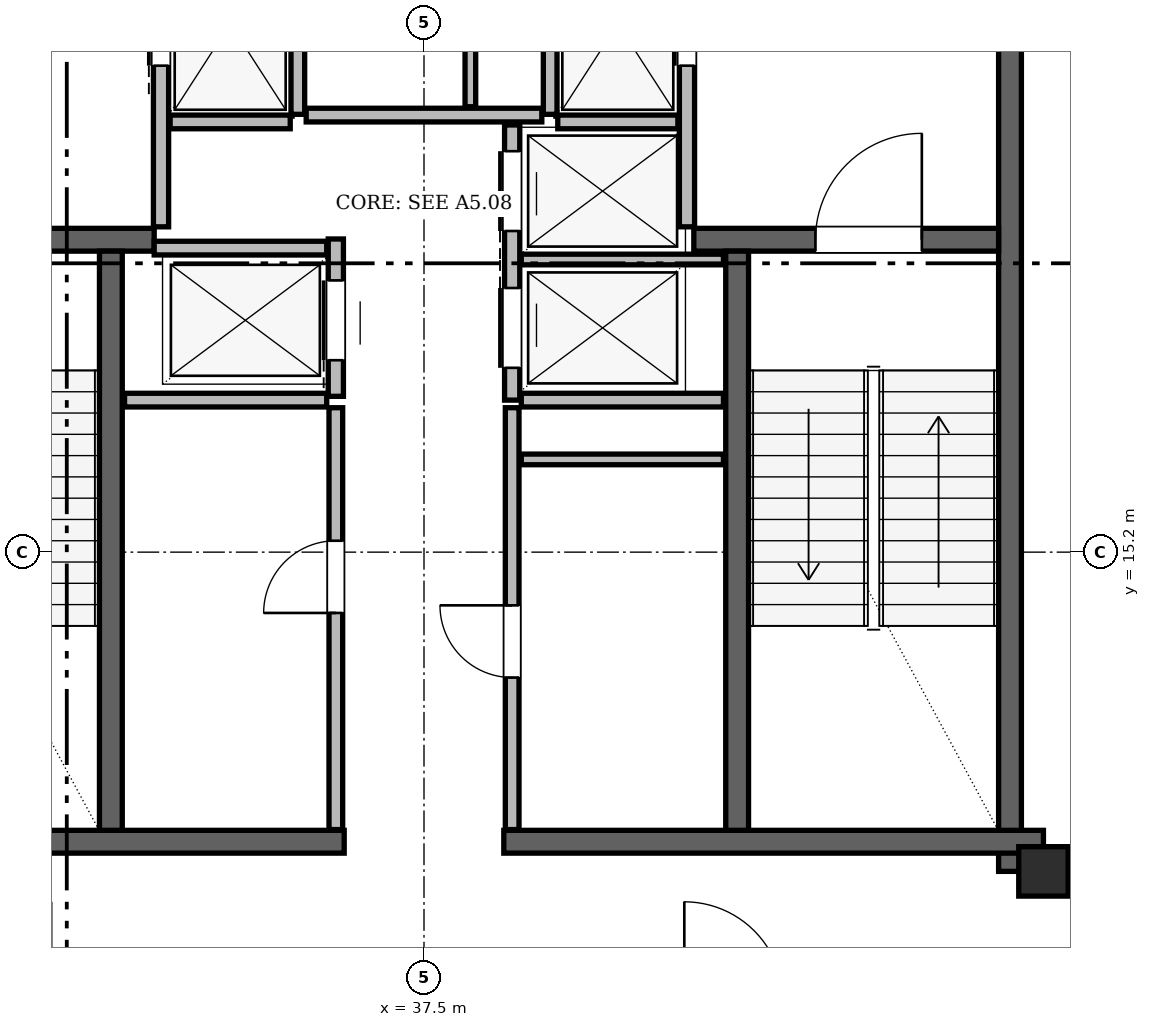
"""IFC4 building model, lengths in metres.
Left out: names, types, materials, properties, quantities, classifications, styles, units other than length and angle.
Written with IfcOpenShell. Run it as: python <this file> out.ifc"""

import sys

from ifc_helpers import new_model, si_unit, direction, frame, frame_2d, origin, origin_2d, place, context, subcontext, project, spatial, rectangle, hollow_rectangle, extrude, element, fill, save


model = new_model("IFC4")
c1 = context("Model", 3, precision=1e-05, world=origin(), true_north=direction((0.0, 1.0)))
c2 = subcontext(c1, "Body", "Model", "MODEL_VIEW")
j1 = project(units=[si_unit("LENGTHUNIT", "METRE"), si_unit("PLANEANGLEUNIT", "RADIAN")], contexts=[c1])
p1 = place(None, origin())
s1 = spatial("IfcSite", under=j1, at=p1, CompositionType="ELEMENT")
p2 = place(p1, origin())
s2 = spatial("IfcBuilding", under=s1, at=p2, CompositionType="ELEMENT")
p3 = place(p2, frame((0.0, 0.0, 305.1)))
s3 = spatial("IfcBuildingStorey", under=s2, at=p3, CompositionType="ELEMENT", Elevation=305.1)
p4 = place(p3, frame((45.65, 11.0, 0.0), z_axis=(0.0, 0.0, 1.0), x_axis=(1.0, 0.0, 0.0)))
e1 = element("IfcColumn", 1, at=p4, inside=s3, PredefinedType="COLUMN", context=c2, shape_type="SweptSolid", body=[
    extrude(hollow_rectangle(XDim=0.65, YDim=0.65, WallThickness=0.05, at=origin_2d()), origin(), (0.0, 0.0, 1.0), 4.5),
])
p5 = place(p3, frame((45.21, 11.0, 0.0), z_axis=(0.0, 0.0, 1.0), x_axis=(0.0, 1.0, 0.0)))
e2 = element("IfcWall", 2, at=p5, inside=s3, PredefinedType="SHEAR", context=c2, shape_type="SweptSolid", body=[
    extrude(rectangle(XDim=13.3, YDim=0.3, at=frame_2d((6.65, 0.0))), origin(), (0.0, 0.0, 1.0), 4.28),
])
for number, where, z_axis, x_axis in (
    (3, (29.35, 11.39, 0.0), (0.0, 0.0, 1.0), (1.0, 0.0, 0.0)),
    (4, (38.55, 11.39, 0.0), (0.0, 0.0, 1.0), (1.0, 0.0, 0.0)),
):
    element("IfcWall", number, at=place(p3, frame(where, z_axis=z_axis, x_axis=x_axis)), inside=s3, PredefinedType="SHEAR", context=c2, shape_type="SweptSolid", body=[
        extrude(rectangle(XDim=7.1, YDim=0.3, at=frame_2d((3.55, 0.0))), origin(), (0.0, 0.0, 1.0), 4.28),
    ])
p6 = place(p3, frame((29.94, 19.31, 0.0), z_axis=(0.0, 0.0, 1.0), x_axis=(1.0, 0.0, 0.0)))
e5 = element("IfcWall", 5, at=p6, inside=s3, PredefinedType="SHEAR", context=c2, shape_type="SweptSolid", body=[
    extrude(rectangle(XDim=4.01, YDim=0.3, at=frame_2d((2.005, 0.0))), origin(), (0.0, 0.0, 1.0), 4.28),
])
p7 = place(p6, frame((1.01, 0.0, 0.0)))
e6 = element("IfcOpeningElement", 6, at=p7, cuts=e5, PredefinedType="OPENING", context=c2, shape_type="SweptSolid", body=[
    extrude(rectangle(XDim=1.4, YDim=2.2, at=frame_2d((0.7, 1.1))), frame((0.0, 0.15, 0.0), z_axis=(0.0, -1.0, 0.0), x_axis=(1.0, 0.0, 0.0)), (0.0, 0.0, 1.0), 0.3),
])
p8 = place(p3, frame((41.05, 19.31, 0.0), z_axis=(0.0, 0.0, 1.0), x_axis=(1.0, 0.0, 0.0)))
e7 = element("IfcWall", 7, at=p8, inside=s3, PredefinedType="SHEAR", context=c2, shape_type="SweptSolid", body=[
    extrude(rectangle(XDim=4.01, YDim=0.3, at=frame_2d((2.005, 0.0))), origin(), (0.0, 0.0, 1.0), 4.28),
])
p9 = place(p8, frame((1.6, 0.0, 0.0)))
e8 = element("IfcOpeningElement", 8, at=p9, cuts=e7, PredefinedType="OPENING", context=c2, shape_type="SweptSolid", body=[
    extrude(rectangle(XDim=1.4, YDim=2.2, at=frame_2d((0.7, 1.1))), frame((0.0, 0.15, 0.0), z_axis=(0.0, -1.0, 0.0), x_axis=(1.0, 0.0, 0.0)), (0.0, 0.0, 1.0), 0.3),
])
for number, where, z_axis, x_axis in (
    (9, (33.38, 11.54, 0.0), (0.0, 0.0, 1.0), (0.0, 1.0, 0.0)),
    (10, (41.62, 11.54, 0.0), (0.0, 0.0, 1.0), (0.0, 1.0, 0.0)),
):
    element("IfcWall", number, at=place(p3, frame(where, z_axis=z_axis, x_axis=x_axis)), inside=s3, PredefinedType="SHEAR", context=c2, shape_type="SweptSolid", body=[
        extrude(rectangle(XDim=7.62, YDim=0.3, at=frame_2d((3.81, 0.0))), origin(), (0.0, 0.0, 1.0), 4.28),
    ])
p10 = place(p3, frame((34.04, 19.48, 0.0), z_axis=(0.0, 0.0, 1.0), x_axis=(0.0, 1.0, 0.0)))
e11 = element("IfcWall", 11, at=p10, inside=s3, PredefinedType="PARTITIONING", context=c2, shape_type="SweptSolid", body=[
    extrude(rectangle(XDim=4.5, YDim=0.2, at=frame_2d((2.25, 0.0))), origin(), (0.0, 0.0, 1.0), 4.28),
])
p11 = place(p10, frame((2.12, 0.0, 0.0)))
e12 = element("IfcOpeningElement", 12, at=p11, cuts=e11, PredefinedType="OPENING", context=c2, shape_type="SweptSolid", body=[
    extrude(rectangle(XDim=1.1, YDim=2.2, at=frame_2d((0.55, 1.1))), frame((0.0, 0.1, 0.0), z_axis=(0.0, -1.0, 0.0), x_axis=(1.0, 0.0, 0.0)), (0.0, 0.0, 1.0), 0.2),
])
p12 = place(p3, frame((35.84, 20.96, 0.0), z_axis=(0.0, 0.0, 1.0), x_axis=(0.0, 1.0, 0.0)))
e13 = element("IfcWall", 13, at=p12, inside=s3, PredefinedType="PARTITIONING", context=c2, shape_type="SweptSolid", body=[
    extrude(rectangle(XDim=3.02, YDim=0.18, at=frame_2d((1.51, 0.0))), origin(), (0.0, 0.0, 1.0), 4.28),
])
p13 = place(p3, frame((34.16, 20.86, 0.0), z_axis=(0.0, 0.0, 1.0), x_axis=(1.0, 0.0, 0.0)))
e14 = element("IfcWall", 14, at=p13, inside=s3, PredefinedType="PARTITIONING", context=c2, shape_type="SweptSolid", body=[
    extrude(rectangle(XDim=1.58, YDim=0.18, at=frame_2d((0.79, 0.0))), origin(), (0.0, 0.0, 1.0), 4.28),
])
p14 = place(p3, frame((40.96, 19.48, 0.0), z_axis=(0.0, 0.0, 1.0), x_axis=(0.0, 1.0, 0.0)))
e15 = element("IfcWall", 15, at=p14, inside=s3, PredefinedType="PARTITIONING", context=c2, shape_type="SweptSolid", body=[
    extrude(rectangle(XDim=4.5, YDim=0.2, at=frame_2d((2.25, 0.0))), origin(), (0.0, 0.0, 1.0), 4.28),
])
p15 = place(p14, frame((2.12, 0.0, 0.0)))
e16 = element("IfcOpeningElement", 16, at=p15, cuts=e15, PredefinedType="OPENING", context=c2, shape_type="SweptSolid", body=[
    extrude(rectangle(XDim=1.1, YDim=2.2, at=frame_2d((0.55, 1.1))), frame((0.0, 0.1, 0.0), z_axis=(0.0, -1.0, 0.0), x_axis=(1.0, 0.0, 0.0)), (0.0, 0.0, 1.0), 0.2),
])
p16 = place(p3, frame((39.16, 20.96, 0.0), z_axis=(0.0, 0.0, 1.0), x_axis=(0.0, 1.0, 0.0)))
e17 = element("IfcWall", 17, at=p16, inside=s3, PredefinedType="PARTITIONING", context=c2, shape_type="SweptSolid", body=[
    extrude(rectangle(XDim=3.02, YDim=0.18, at=frame_2d((1.51, 0.0))), origin(), (0.0, 0.0, 1.0), 4.28),
])
p17 = place(p3, frame((39.26, 20.86, 0.0), z_axis=(0.0, 0.0, 1.0), x_axis=(1.0, 0.0, 0.0)))
e18 = element("IfcWall", 18, at=p17, inside=s3, PredefinedType="PARTITIONING", context=c2, shape_type="SweptSolid", body=[
    extrude(rectangle(XDim=1.58, YDim=0.18, at=frame_2d((0.79, 0.0))), origin(), (0.0, 0.0, 1.0), 4.28),
])
p18 = place(p3, frame((36.34, 17.25, 0.0), z_axis=(0.0, 0.0, 1.0), x_axis=(0.0, 1.0, 0.0)))
e19 = element("IfcWall", 19, at=p18, inside=s3, PredefinedType="PARTITIONING", context=c2, shape_type="SweptSolid", body=[
    extrude(rectangle(XDim=2.07, YDim=0.2, at=frame_2d((1.035, 0.0))), origin(), (0.0, 0.0, 1.0), 4.28),
])
p19 = place(p18, frame((0.475, 0.0, 0.0)))
e20 = element("IfcOpeningElement", 20, at=p19, cuts=e19, PredefinedType="OPENING", context=c2, shape_type="SweptSolid", body=[
    extrude(rectangle(XDim=1.05, YDim=2.15, at=frame_2d((0.525, 1.075))), frame((0.0, 0.1, 0.0), z_axis=(0.0, -1.0, 0.0), x_axis=(1.0, 0.0, 0.0)), (0.0, 0.0, 1.0), 0.2),
])
p20 = place(p3, frame((33.95, 19.2, 0.0), z_axis=(0.0, 0.0, 1.0), x_axis=(1.0, 0.0, 0.0)))
e21 = element("IfcWall", 21, at=p20, inside=s3, PredefinedType="PARTITIONING", context=c2, shape_type="SweptSolid", body=[
    extrude(rectangle(XDim=2.27, YDim=0.18, at=frame_2d((1.135, 0.0))), origin(), (0.0, 0.0, 1.0), 4.28),
])
p21 = place(p3, frame((33.56, 17.2, 0.0), z_axis=(0.0, 0.0, 1.0), x_axis=(1.0, 0.0, 0.0)))
e22 = element("IfcWall", 22, at=p21, inside=s3, PredefinedType="PARTITIONING", context=c2, shape_type="SweptSolid", body=[
    extrude(rectangle(XDim=2.66, YDim=0.18, at=frame_2d((1.33, 0.0))), origin(), (0.0, 0.0, 1.0), 4.28),
])
p22 = place(p3, frame((36.34, 11.55, 0.0), z_axis=(0.0, 0.0, 1.0), x_axis=(0.0, 1.0, 0.0)))
e23 = element("IfcWall", 23, at=p22, inside=s3, PredefinedType="PARTITIONING", context=c2, shape_type="SweptSolid", body=[
    extrude(rectangle(XDim=5.55, YDim=0.18, at=frame_2d((2.775, 0.0))), origin(), (0.0, 0.0, 1.0), 4.28),
])
p23 = place(p22, frame((2.85, 0.0, 0.0)))
e24 = element("IfcOpeningElement", 24, at=p23, cuts=e23, PredefinedType="OPENING", context=c2, shape_type="SweptSolid", body=[
    extrude(rectangle(XDim=0.95, YDim=2.1, at=frame_2d((0.475, 1.05))), frame((0.0, 0.09, 0.0), z_axis=(0.0, -1.0, 0.0), x_axis=(1.0, 0.0, 0.0)), (0.0, 0.0, 1.0), 0.18),
])
p24 = place(p3, frame((38.66, 17.2, 0.0), z_axis=(0.0, 0.0, 1.0), x_axis=(0.0, 1.0, 0.0)))
e25 = element("IfcWall", 25, at=p24, inside=s3, PredefinedType="PARTITIONING", context=c2, shape_type="SweptSolid", body=[
    extrude(rectangle(XDim=3.62, YDim=0.2, at=frame_2d((1.81, 0.0))), origin(), (0.0, 0.0, 1.0), 4.28),
])
p25 = place(p24, frame((0.425, 0.0, 0.0)))
e26 = element("IfcOpeningElement", 26, at=p25, cuts=e25, PredefinedType="OPENING", context=c2, shape_type="SweptSolid", body=[
    extrude(rectangle(XDim=1.05, YDim=2.15, at=frame_2d((0.525, 1.075))), frame((0.0, 0.1, 0.0), z_axis=(0.0, -1.0, 0.0), x_axis=(1.0, 0.0, 0.0)), (0.0, 0.0, 1.0), 0.2),
])
p26 = place(p24, frame((2.225, 0.0, 0.0)))
e27 = element("IfcOpeningElement", 27, at=p26, cuts=e25, PredefinedType="OPENING", context=c2, shape_type="SweptSolid", body=[
    extrude(rectangle(XDim=1.05, YDim=2.15, at=frame_2d((0.525, 1.075))), frame((0.0, 0.1, 0.0), z_axis=(0.0, -1.0, 0.0), x_axis=(1.0, 0.0, 0.0)), (0.0, 0.0, 1.0), 0.2),
])
p27 = place(p3, frame((38.78, 17.2, 0.0), z_axis=(0.0, 0.0, 1.0), x_axis=(1.0, 0.0, 0.0)))
e28 = element("IfcWall", 28, at=p27, inside=s3, PredefinedType="PARTITIONING", context=c2, shape_type="SweptSolid", body=[
    extrude(rectangle(XDim=2.66, YDim=0.18, at=frame_2d((1.33, 0.0))), origin(), (0.0, 0.0, 1.0), 4.28),
])
p28 = place(p3, frame((38.78, 19.05, 0.0), z_axis=(0.0, 0.0, 1.0), x_axis=(1.0, 0.0, 0.0)))
e29 = element("IfcWall", 29, at=p28, inside=s3, PredefinedType="PARTITIONING", context=c2, shape_type="SweptSolid", body=[
    extrude(rectangle(XDim=2.66, YDim=0.14, at=frame_2d((1.33, 0.0))), origin(), (0.0, 0.0, 1.0), 4.28),
])
p29 = place(p3, frame((38.66, 11.55, 0.0), z_axis=(0.0, 0.0, 1.0), x_axis=(0.0, 1.0, 0.0)))
e30 = element("IfcWall", 30, at=p29, inside=s3, PredefinedType="PARTITIONING", context=c2, shape_type="SweptSolid", body=[
    extrude(rectangle(XDim=5.55, YDim=0.18, at=frame_2d((2.775, 0.0))), origin(), (0.0, 0.0, 1.0), 4.28),
])
p30 = place(p29, frame((2.0, 0.0, 0.0)))
e31 = element("IfcOpeningElement", 31, at=p30, cuts=e30, PredefinedType="OPENING", context=c2, shape_type="SweptSolid", body=[
    extrude(rectangle(XDim=0.95, YDim=2.1, at=frame_2d((0.475, 1.05))), frame((0.0, 0.09, 0.0), z_axis=(0.0, -1.0, 0.0), x_axis=(1.0, 0.0, 0.0)), (0.0, 0.0, 1.0), 0.18),
])
p31 = place(p3, frame((38.78, 16.42, 0.0), z_axis=(0.0, 0.0, 1.0), x_axis=(1.0, 0.0, 0.0)))
e32 = element("IfcWall", 32, at=p31, inside=s3, PredefinedType="PARTITIONING", context=c2, shape_type="SweptSolid", body=[
    extrude(rectangle(XDim=2.66, YDim=0.14, at=frame_2d((1.33, 0.0))), origin(), (0.0, 0.0, 1.0), 4.28),
])
p32 = place(p3, frame((35.95, 20.95, 0.0), z_axis=(0.0, 0.0, 1.0), x_axis=(1.0, 0.0, 0.0)))
e33 = element("IfcWall", 33, at=p32, inside=s3, PredefinedType="PARTITIONING", context=c2, shape_type="SweptSolid", body=[
    extrude(rectangle(XDim=3.1, YDim=0.18, at=frame_2d((1.55, 0.0))), origin(), (0.0, 0.0, 1.0), 4.28),
])
p33 = place(p3, frame((38.11, 21.06, 0.0), z_axis=(0.0, 0.0, 1.0), x_axis=(0.0, 1.0, 0.0)))
e34 = element("IfcWall", 34, at=p33, inside=s3, PredefinedType="PARTITIONING", context=c2, shape_type="SweptSolid", body=[
    extrude(rectangle(XDim=2.92, YDim=0.14, at=frame_2d((1.46, 0.0))), origin(), (0.0, 0.0, 1.0), 4.28),
])
p34 = place(p3, frame((45.99, 10.95, 0.0), z_axis=(0.0, 0.0, 1.0), x_axis=(1.0, 0.0, 0.0)))
e35 = element("IfcWall", 35, at=p34, inside=s3, PredefinedType="PARTITIONING", context=c2, shape_type="SweptSolid", body=[
    extrude(rectangle(XDim=0.45, YDim=0.2, at=frame_2d((0.225, 0.0))), origin(), (0.0, 0.0, 1.0), 3.866),
])
p35 = place(p23, origin())
e36 = element("IfcDoor", 36, at=p35, inside=s3, OperationType="SINGLE_SWING_LEFT", PredefinedType="DOOR", context=c2, shape_type="SweptSolid", body=[
    extrude(rectangle(XDim=0.95, YDim=2.1, at=frame_2d((0.475, 1.05))), frame((0.0, 0.025, 0.0), z_axis=(0.0, -1.0, 0.0), x_axis=(1.0, 0.0, 0.0)), (0.0, 0.0, 1.0), 0.05),
])
fill(e24, e36)
p36 = place(p30, origin())
e37 = element("IfcDoor", 37, at=p36, inside=s3, OperationType="SINGLE_SWING_RIGHT", PredefinedType="DOOR", context=c2, shape_type="SweptSolid", body=[
    extrude(rectangle(XDim=0.95, YDim=2.1, at=frame_2d((0.475, 1.05))), frame((0.0, 0.025, 0.0), z_axis=(0.0, -1.0, 0.0), x_axis=(1.0, 0.0, 0.0)), (0.0, 0.0, 1.0), 0.05),
])
fill(e31, e37)
p37 = place(p11, origin())
e38 = element("IfcDoor", 38, at=p37, inside=s3, OperationType="SLIDING_TO_LEFT", PredefinedType="DOOR", context=c2, shape_type="SweptSolid", body=[
    extrude(rectangle(XDim=1.1, YDim=2.2, at=frame_2d((0.55, 1.1))), frame((0.0, 0.025, 0.0), z_axis=(0.0, -1.0, 0.0), x_axis=(1.0, 0.0, 0.0)), (0.0, 0.0, 1.0), 0.05),
])
fill(e12, e38)
p38 = place(p15, origin())
e39 = element("IfcDoor", 39, at=p38, inside=s3, OperationType="SLIDING_TO_RIGHT", PredefinedType="DOOR", context=c2, shape_type="SweptSolid", body=[
    extrude(rectangle(XDim=1.1, YDim=2.2, at=frame_2d((0.55, 1.1))), frame((0.0, 0.025, 0.0), z_axis=(0.0, -1.0, 0.0), x_axis=(1.0, 0.0, 0.0)), (0.0, 0.0, 1.0), 0.05),
])
fill(e16, e39)
p39 = place(p19, origin())
e40 = element("IfcDoor", 40, at=p39, inside=s3, OperationType="SLIDING_TO_LEFT", PredefinedType="DOOR", context=c2, shape_type="SweptSolid", body=[
    extrude(rectangle(XDim=1.05, YDim=2.15, at=frame_2d((0.525, 1.075))), frame((0.0, 0.025, 0.0), z_axis=(0.0, -1.0, 0.0), x_axis=(1.0, 0.0, 0.0)), (0.0, 0.0, 1.0), 0.05),
])
fill(e20, e40)
p40 = place(p25, origin())
e41 = element("IfcDoor", 41, at=p40, inside=s3, OperationType="SLIDING_TO_RIGHT", PredefinedType="DOOR", context=c2, shape_type="SweptSolid", body=[
    extrude(rectangle(XDim=1.05, YDim=2.15, at=frame_2d((0.525, 1.075))), frame((0.0, 0.025, 0.0), z_axis=(0.0, -1.0, 0.0), x_axis=(1.0, 0.0, 0.0)), (0.0, 0.0, 1.0), 0.05),
])
fill(e26, e41)
p41 = place(p26, origin())
e42 = element("IfcDoor", 42, at=p41, inside=s3, OperationType="SLIDING_TO_LEFT", PredefinedType="DOOR", context=c2, shape_type="SweptSolid", body=[
    extrude(rectangle(XDim=1.05, YDim=2.15, at=frame_2d((0.525, 1.075))), frame((0.0, 0.025, 0.0), z_axis=(0.0, -1.0, 0.0), x_axis=(1.0, 0.0, 0.0)), (0.0, 0.0, 1.0), 0.05),
])
fill(e27, e42)
p42 = place(p9, origin())
e43 = element("IfcDoor", 43, at=p42, inside=s3, OperationType="SINGLE_SWING_RIGHT", PredefinedType="DOOR", context=c2, shape_type="SweptSolid", body=[
    extrude(rectangle(XDim=1.4, YDim=2.2, at=frame_2d((0.7, 1.1))), frame((0.0, 0.025, 0.0), z_axis=(0.0, -1.0, 0.0), x_axis=(1.0, 0.0, 0.0)), (0.0, 0.0, 1.0), 0.05),
])
fill(e8, e43)
save(model, sys.argv[1])
